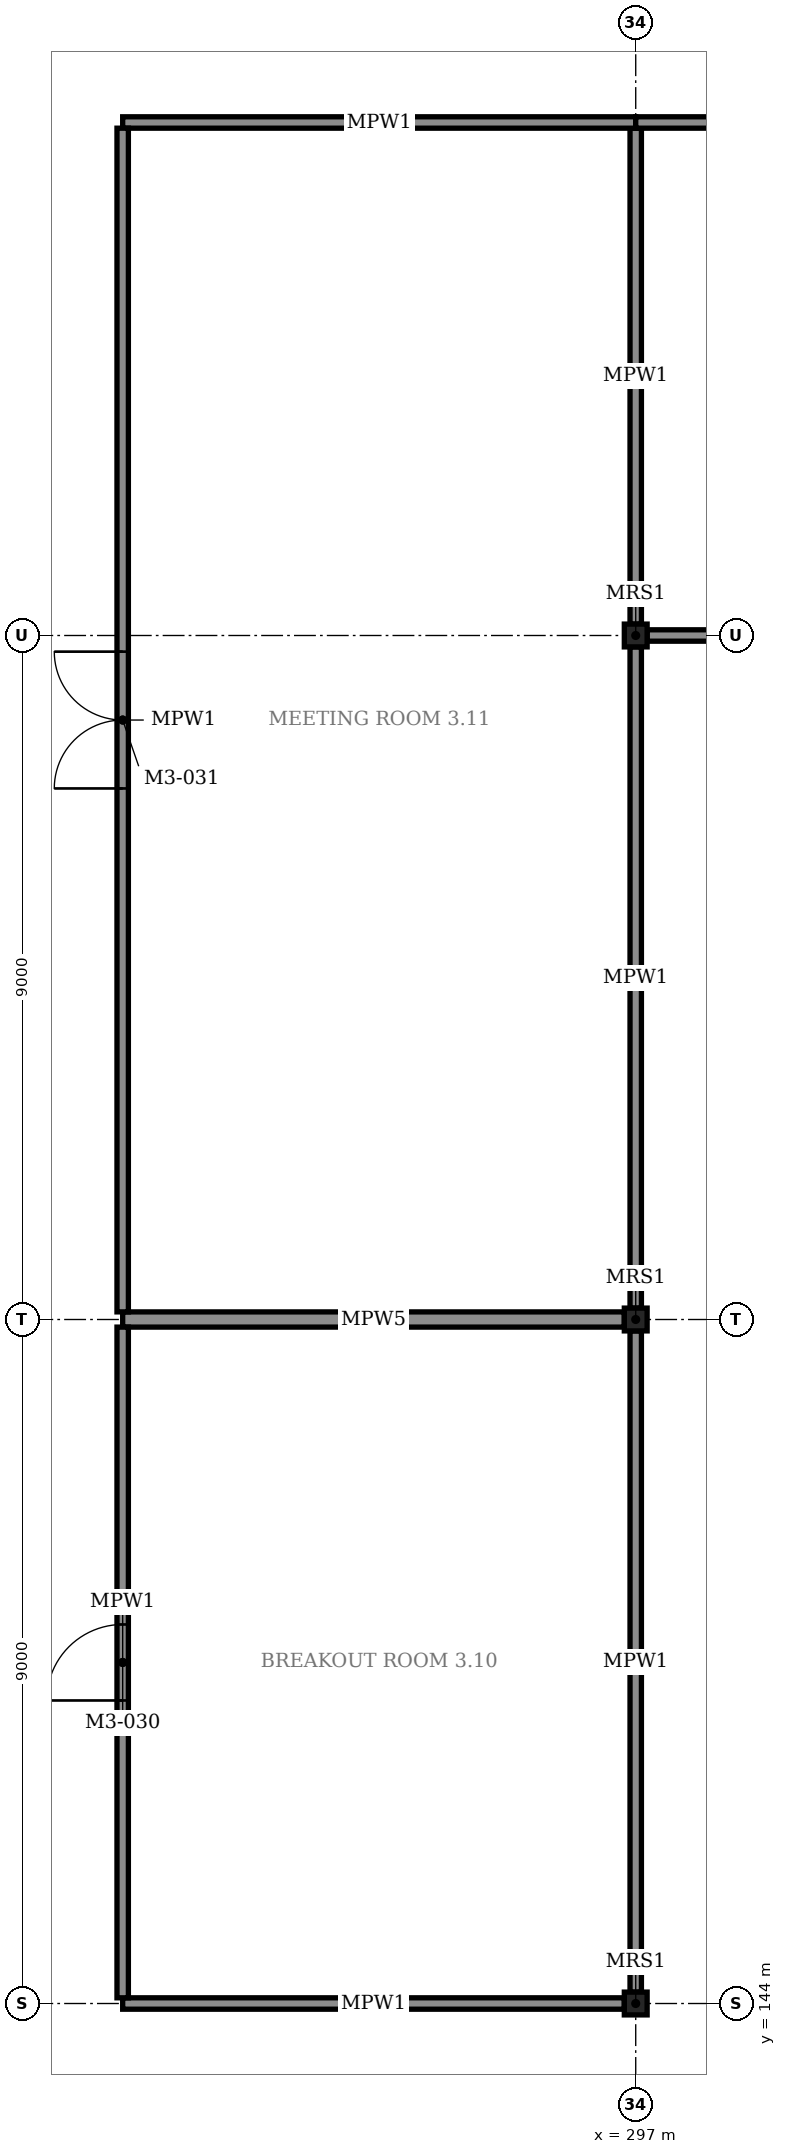
"""IFC4 building model, lengths in metres.
Left out: names, types, materials, properties, quantities, classifications, styles, units other than length and angle.
Written with IfcOpenShell. Run it as: python <this file> out.ifc"""

import sys

from ifc_helpers import new_model, si_unit, direction, frame, frame_2d, origin, origin_2d, place, context, subcontext, project, spatial, rectangle, hollow_rectangle, extrude, element, fill, save


model = new_model("IFC4")
c1 = context("Model", 3, precision=1e-05, world=origin(), true_north=direction((0.0, 1.0)))
c2 = subcontext(c1, "Body", "Model", "MODEL_VIEW")
j1 = project(units=[si_unit("LENGTHUNIT", "METRE"), si_unit("PLANEANGLEUNIT", "RADIAN")], contexts=[c1])
p1 = place(None, origin())
s1 = spatial("IfcSite", under=j1, at=p1, CompositionType="ELEMENT")
p2 = place(p1, origin())
s2 = spatial("IfcBuilding", under=s1, at=p2, CompositionType="ELEMENT")
p3 = place(p2, frame((0.0, 0.0, 17.0)))
s3 = spatial("IfcBuildingStorey", under=s2, at=p3, CompositionType="ELEMENT", Elevation=17.0)
for number, where, z_axis, x_axis in (
    (1, (297.0, 144.0, 0.0), (0.0, 0.0, 1.0), (1.0, 0.0, 0.0)),
    (2, (297.0, 153.0, 0.0), (0.0, 0.0, 1.0), (1.0, 0.0, 0.0)),
    (3, (297.0, 162.0, 0.0), (0.0, 0.0, 1.0), (1.0, 0.0, 0.0)),
):
    element("IfcColumn", number, at=place(p3, frame(where, z_axis=z_axis, x_axis=x_axis)), inside=s3, PredefinedType="COLUMN", context=c2, shape_type="SweptSolid", body=[
        extrude(hollow_rectangle(XDim=0.3, YDim=0.3, WallThickness=0.012, InnerFilletRadius=0.024, OuterFilletRadius=0.036, at=origin_2d()), origin(), (0.0, 0.0, 1.0), 3.1),
    ])
p4 = place(p3, frame((290.25, 144.0, 0.0), z_axis=(0.0, 0.0, 1.0), x_axis=(1.0, 0.0, 0.0)))
e4 = element("IfcWall", 4, at=p4, inside=s3, PredefinedType="PARTITIONING", context=c2, shape_type="SweptSolid", body=[
    extrude(rectangle(XDim=6.6, YDim=0.15, at=frame_2d((3.3, 0.0))), origin(), (0.0, 0.0, 1.0), 3.0),
])
p5 = place(p3, frame((290.25, 153.0, 0.0), z_axis=(0.0, 0.0, 1.0), x_axis=(1.0, 0.0, 0.0)))
e5 = element("IfcWall", 5, at=p5, inside=s3, PredefinedType="PARTITIONING", context=c2, shape_type="SweptSolid", body=[
    extrude(rectangle(XDim=6.6, YDim=0.2, at=frame_2d((3.3, 0.0))), origin(), (0.0, 0.0, 1.0), 3.0),
])
p6 = place(p3, frame((290.25, 144.075, 0.0), z_axis=(0.0, 0.0, 1.0), x_axis=(0.0, 1.0, 0.0)))
e6 = element("IfcWall", 6, at=p6, inside=s3, PredefinedType="PARTITIONING", context=c2, shape_type="SweptSolid", body=[
    extrude(rectangle(XDim=8.825, YDim=0.15, at=frame_2d((4.413, 0.0))), origin(), (0.0, 0.0, 1.0), 3.0),
])
p7 = place(p6, frame((3.912, 0.0, 0.0)))
e7 = element("IfcOpeningElement", 7, at=p7, cuts=e6, PredefinedType="OPENING", context=c2, shape_type="SweptSolid", body=[
    extrude(rectangle(XDim=1.0, YDim=2.4, at=frame_2d((0.5, 1.2))), frame((0.0, 0.085, 0.0), z_axis=(0.0, -1.0, 0.0), x_axis=(1.0, 0.0, 0.0)), (0.0, 0.0, 1.0), 0.17),
])
p8 = place(p3, frame((297.0, 144.15, 0.0), z_axis=(0.0, 0.0, 1.0), x_axis=(0.0, 1.0, 0.0)))
e8 = element("IfcWall", 8, at=p8, inside=s3, PredefinedType="PARTITIONING", context=c2, shape_type="SweptSolid", body=[
    extrude(rectangle(XDim=8.7, YDim=0.15, at=frame_2d((4.35, 0.0))), origin(), (0.0, 0.0, 1.0), 3.0),
])
p9 = place(p3, frame((290.25, 168.75, 0.0), z_axis=(0.0, 0.0, 1.0), x_axis=(1.0, 0.0, 0.0)))
e9 = element("IfcWall", 9, at=p9, inside=s3, PredefinedType="PARTITIONING", context=c2, shape_type="SweptSolid", body=[
    extrude(rectangle(XDim=6.75, YDim=0.15, at=frame_2d((3.375, 0.0))), origin(), (0.0, 0.0, 1.0), 3.0),
])
p10 = place(p3, frame((290.25, 153.1, 0.0), z_axis=(0.0, 0.0, 1.0), x_axis=(0.0, 1.0, 0.0)))
e10 = element("IfcWall", 10, at=p10, inside=s3, PredefinedType="PARTITIONING", context=c2, shape_type="SweptSolid", body=[
    extrude(rectangle(XDim=15.575, YDim=0.15, at=frame_2d((7.788, 0.0))), origin(), (0.0, 0.0, 1.0), 3.0),
])
p11 = place(p10, frame((6.887, 0.0, 0.0)))
e11 = element("IfcOpeningElement", 11, at=p11, cuts=e10, PredefinedType="OPENING", context=c2, shape_type="SweptSolid", body=[
    extrude(rectangle(XDim=1.8, YDim=2.4, at=frame_2d((0.9, 1.2))), frame((0.0, 0.085, 0.0), z_axis=(0.0, -1.0, 0.0), x_axis=(1.0, 0.0, 0.0)), (0.0, 0.0, 1.0), 0.17),
])
p12 = place(p3, frame((297.0, 153.15, 0.0), z_axis=(0.0, 0.0, 1.0), x_axis=(0.0, 1.0, 0.0)))
e12 = element("IfcWall", 12, at=p12, inside=s3, PredefinedType="PARTITIONING", context=c2, shape_type="SweptSolid", body=[
    extrude(rectangle(XDim=8.7, YDim=0.15, at=frame_2d((4.35, 0.0))), origin(), (0.0, 0.0, 1.0), 3.0),
])
p13 = place(p3, frame((297.0, 162.15, 0.0), z_axis=(0.0, 0.0, 1.0), x_axis=(0.0, 1.0, 0.0)))
e13 = element("IfcWall", 13, at=p13, inside=s3, PredefinedType="PARTITIONING", context=c2, shape_type="SweptSolid", body=[
    extrude(rectangle(XDim=6.525, YDim=0.15, at=frame_2d((3.263, 0.0))), origin(), (0.0, 0.0, 1.0), 3.0),
])
p14 = place(p3, frame((297.15, 162.0, 0.0), z_axis=(0.0, 0.0, 1.0), x_axis=(1.0, 0.0, 0.0)))
e14 = element("IfcWall", 14, at=p14, inside=s3, PredefinedType="PARTITIONING", context=c2, shape_type="SweptSolid", body=[
    extrude(rectangle(XDim=8.7, YDim=0.15, at=frame_2d((4.35, 0.0))), origin(), (0.0, 0.0, 1.0), 3.0),
])
p15 = place(p14, frame((3.45, 0.0, 0.0)))
e15 = element("IfcOpeningElement", 15, at=p15, cuts=e14, PredefinedType="OPENING", context=c2, shape_type="SweptSolid", body=[
    extrude(rectangle(XDim=1.8, YDim=2.4, at=frame_2d((0.9, 1.2))), frame((0.0, 0.085, 0.0), z_axis=(0.0, -1.0, 0.0), x_axis=(1.0, 0.0, 0.0)), (0.0, 0.0, 1.0), 0.17),
])
p16 = place(p3, frame((297.0, 168.75, 0.0), z_axis=(0.0, 0.0, 1.0), x_axis=(1.0, 0.0, 0.0)))
e16 = element("IfcWall", 16, at=p16, inside=s3, PredefinedType="PARTITIONING", context=c2, shape_type="SweptSolid", body=[
    extrude(rectangle(XDim=27.0, YDim=0.15, at=frame_2d((13.5, 0.0))), origin(), (0.0, 0.0, 1.0), 3.0),
])
p17 = place(p7, origin())
e17 = element("IfcDoor", 17, at=p17, inside=s3, OperationType="SINGLE_SWING_LEFT", PredefinedType="DOOR", context=c2, shape_type="SweptSolid", body=[
    extrude(rectangle(XDim=1.0, YDim=2.4, at=frame_2d((0.5, 1.2))), frame((0.0, 0.025, 0.0), z_axis=(0.0, -1.0, 0.0), x_axis=(1.0, 0.0, 0.0)), (0.0, 0.0, 1.0), 0.05),
])
fill(e7, e17)
p18 = place(p11, origin())
e18 = element("IfcDoor", 18, at=p18, inside=s3, OperationType="DOUBLE_DOOR_SINGLE_SWING", PredefinedType="DOOR", context=c2, shape_type="SweptSolid", body=[
    extrude(rectangle(XDim=1.8, YDim=2.4, at=frame_2d((0.9, 1.2))), frame((0.0, 0.025, 0.0), z_axis=(0.0, -1.0, 0.0), x_axis=(1.0, 0.0, 0.0)), (0.0, 0.0, 1.0), 0.05),
])
fill(e11, e18)
save(model, sys.argv[1])
